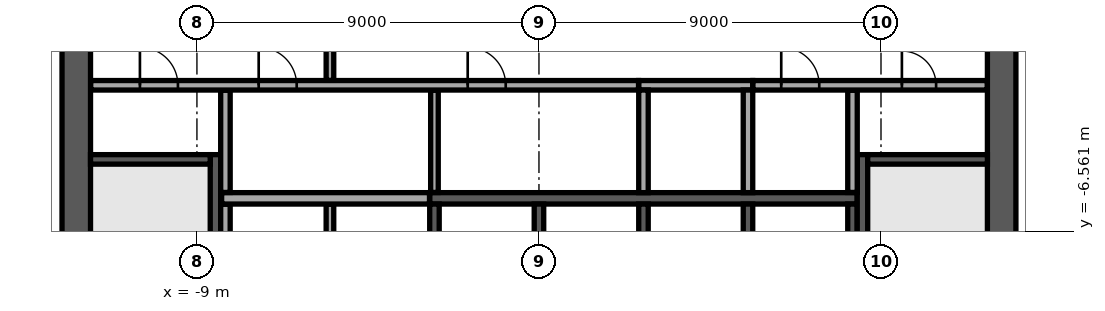
"""IFC4 building model, lengths in metres.
Left out: names, types, materials, properties, quantities, classifications, styles, units other than length and angle.
Written with IfcOpenShell. Run it as: python <this file> out.ifc"""

import sys

from ifc_helpers import new_model, si_unit, direction, frame, frame_2d, origin, place, context, subcontext, project, spatial, rectangle, extrude, element, fill, save


model = new_model("IFC4")
c1 = context("Model", 3, precision=1e-05, world=origin(), true_north=direction((0.0, 1.0)))
c2 = subcontext(c1, "Body", "Model", "MODEL_VIEW")
j1 = project(units=[si_unit("LENGTHUNIT", "METRE"), si_unit("PLANEANGLEUNIT", "RADIAN")], contexts=[c1])
p1 = place(None, origin())
s1 = spatial("IfcSite", under=j1, at=p1, CompositionType="ELEMENT")
p2 = place(p1, origin())
s2 = spatial("IfcBuilding", under=s1, at=p2, CompositionType="ELEMENT")
p3 = place(p2, frame((0.0, 0.0, 262.9)))
s3 = spatial("IfcBuildingStorey", under=s2, at=p3, CompositionType="ELEMENT", Elevation=262.9)
p4 = place(p3, frame((12.175, -11.8, 0.0), z_axis=(0.0, 0.0, 1.0), x_axis=(0.0, 1.0, 0.0)))
e1 = element("IfcWall", 1, at=p4, inside=s3, PredefinedType="SHEAR", context=c2, shape_type="SweptSolid", body=[
    extrude(rectangle(XDim=23.6, YDim=0.75, at=frame_2d((11.8, 0.0))), origin(), (0.0, 0.0, 1.0), 3.64),
])
p5 = place(p4, frame((10.6, 0.0, 0.0)))
e2 = element("IfcOpeningElement", 2, at=p5, cuts=e1, PredefinedType="OPENING", context=c2, shape_type="SweptSolid", body=[
    extrude(rectangle(XDim=2.4, YDim=2.4, at=frame_2d((1.2, 1.2))), frame((0.0, 0.385, 0.0), z_axis=(0.0, -1.0, 0.0), x_axis=(1.0, 0.0, 0.0)), (0.0, 0.0, 1.0), 0.77),
])
p6 = place(p3, frame((-12.175, -11.8, 0.0), z_axis=(0.0, 0.0, 1.0), x_axis=(0.0, 1.0, 0.0)))
e3 = element("IfcWall", 3, at=p6, inside=s3, PredefinedType="SHEAR", context=c2, shape_type="SweptSolid", body=[
    extrude(rectangle(XDim=23.6, YDim=0.75, at=frame_2d((11.8, 0.0))), origin(), (0.0, 0.0, 1.0), 3.64),
])
p7 = place(p6, frame((10.6, 0.0, 0.0)))
e4 = element("IfcOpeningElement", 4, at=p7, cuts=e3, PredefinedType="OPENING", context=c2, shape_type="SweptSolid", body=[
    extrude(rectangle(XDim=2.4, YDim=2.4, at=frame_2d((1.2, 1.2))), frame((0.0, 0.385, 0.0), z_axis=(0.0, -1.0, 0.0), x_axis=(1.0, 0.0, 0.0)), (0.0, 0.0, 1.0), 0.77),
])
p8 = place(p3, frame((-2.875, -5.7, 0.0), z_axis=(0.0, 0.0, 1.0), x_axis=(1.0, 0.0, 0.0)))
e5 = element("IfcWall", 5, at=p8, inside=s3, PredefinedType="SOLIDWALL", context=c2, shape_type="SweptSolid", body=[
    extrude(rectangle(XDim=11.25, YDim=0.3, at=frame_2d((5.625, 0.0))), origin(), (0.0, 0.0, 1.0), 3.64),
])
p9 = place(p3, frame((2.625, -2.725, 0.0), z_axis=(0.0, 0.0, 1.0), x_axis=(1.0, 0.0, 0.0)))
e6 = element("IfcWall", 6, at=p9, inside=s3, PredefinedType="SOLIDWALL", context=c2, shape_type="SweptSolid", body=[
    extrude(rectangle(XDim=3.0, YDim=0.25, at=frame_2d((1.5, 0.0))), origin(), (0.0, 0.0, 1.0), 3.64),
])
for number, where, z_axis, x_axis in (
    (7, (2.75, -5.55, 0.0), (0.0, 0.0, 1.0), (0.0, 1.0, 0.0)),
    (8, (5.5, -5.55, 0.0), (0.0, 0.0, 1.0), (0.0, 1.0, 0.0)),
    (9, (-2.75, -8.55, 0.0), (0.0, 0.0, 1.0), (0.0, 1.0, 0.0)),
    (10, (0.0, -8.55, 0.0), (0.0, 0.0, 1.0), (0.0, 1.0, 0.0)),
    (11, (2.75, -8.55, 0.0), (0.0, 0.0, 1.0), (0.0, 1.0, 0.0)),
    (12, (5.5, -8.55, 0.0), (0.0, 0.0, 1.0), (0.0, 1.0, 0.0)),
    (13, (8.25, -8.55, 0.0), (0.0, 0.0, 1.0), (0.0, 1.0, 0.0)),
):
    element("IfcWall", number, at=place(p3, frame(where, z_axis=z_axis, x_axis=x_axis)), inside=s3, PredefinedType="SOLIDWALL", context=c2, shape_type="SweptSolid", body=[
        extrude(rectangle(XDim=2.7, YDim=0.25, at=frame_2d((1.35, 0.0))), origin(), (0.0, 0.0, 1.0), 3.64),
    ])
p10 = place(p3, frame((-8.512, -4.55, 0.0), z_axis=(0.0, 0.0, 1.0), x_axis=(0.0, -1.0, 0.0)))
e14 = element("IfcWall", 14, at=p10, inside=s3, PredefinedType="SOLIDWALL", context=c2, shape_type="SweptSolid", body=[
    extrude(rectangle(XDim=7.25, YDim=0.275, at=frame_2d((3.625, 0.0))), origin(), (0.0, 0.0, 1.0), 3.64),
])
p11 = place(p10, frame((6.0, 0.0, 0.0)))
e15 = element("IfcOpeningElement", 15, at=p11, cuts=e14, PredefinedType="OPENING", context=c2, shape_type="SweptSolid", body=[
    extrude(rectangle(XDim=1.0, YDim=2.1, at=frame_2d((0.5, 1.05))), frame((0.0, 0.147, 0.0), z_axis=(0.0, -1.0, 0.0), x_axis=(1.0, 0.0, 0.0)), (0.0, 0.0, 1.0), 0.295),
])
p12 = place(p3, frame((-8.65, -4.675, 0.0), z_axis=(0.0, 0.0, 1.0), x_axis=(-1.0, 0.0, 0.0)))
e16 = element("IfcWall", 16, at=p12, inside=s3, PredefinedType="SOLIDWALL", context=c2, shape_type="SweptSolid", body=[
    extrude(rectangle(XDim=3.15, YDim=0.25, at=frame_2d((1.575, 0.0))), origin(), (0.0, 0.0, 1.0), 3.64),
])
p13 = place(p3, frame((8.512, -4.55, 0.0), z_axis=(0.0, 0.0, 1.0), x_axis=(0.0, -1.0, 0.0)))
e17 = element("IfcWall", 17, at=p13, inside=s3, PredefinedType="SOLIDWALL", context=c2, shape_type="SweptSolid", body=[
    extrude(rectangle(XDim=7.25, YDim=0.275, at=frame_2d((3.625, 0.0))), origin(), (0.0, 0.0, 1.0), 3.64),
])
p14 = place(p13, frame((6.0, 0.0, 0.0)))
e18 = element("IfcOpeningElement", 18, at=p14, cuts=e17, PredefinedType="OPENING", context=c2, shape_type="SweptSolid", body=[
    extrude(rectangle(XDim=1.0, YDim=2.1, at=frame_2d((0.5, 1.05))), frame((0.0, 0.147, 0.0), z_axis=(0.0, -1.0, 0.0), x_axis=(1.0, 0.0, 0.0)), (0.0, 0.0, 1.0), 0.295),
])
p15 = place(p3, frame((8.65, -4.675, 0.0), z_axis=(0.0, 0.0, 1.0), x_axis=(1.0, 0.0, 0.0)))
e19 = element("IfcWall", 19, at=p15, inside=s3, PredefinedType="SOLIDWALL", context=c2, shape_type="SweptSolid", body=[
    extrude(rectangle(XDim=3.15, YDim=0.25, at=frame_2d((1.575, 0.0))), origin(), (0.0, 0.0, 1.0), 3.64),
])
p16 = place(p3, frame((-8.25, -8.545, 0.0), z_axis=(0.0, 0.0, 1.0), x_axis=(0.0, 1.0, 0.0)))
e20 = element("IfcWall", 20, at=p16, inside=s3, PredefinedType="PARTITIONING", context=c2, shape_type="SweptSolid", body=[
    extrude(rectangle(XDim=2.69, YDim=0.25, at=frame_2d((1.345, 0.0))), origin(), (0.0, 0.0, 1.0), 3.64),
])
p17 = place(p3, frame((-5.5, -8.545, 0.0), z_axis=(0.0, 0.0, 1.0), x_axis=(0.0, 1.0, 0.0)))
e21 = element("IfcWall", 21, at=p17, inside=s3, PredefinedType="PARTITIONING", context=c2, shape_type="SweptSolid", body=[
    extrude(rectangle(XDim=2.69, YDim=0.2, at=frame_2d((1.345, 0.0))), origin(), (0.0, 0.0, 1.0), 3.64),
])
p18 = place(p3, frame((-8.35, -5.7, 0.0), z_axis=(0.0, 0.0, 1.0), x_axis=(1.0, 0.0, 0.0)))
e22 = element("IfcWall", 22, at=p18, inside=s3, PredefinedType="PARTITIONING", context=c2, shape_type="SweptSolid", body=[
    extrude(rectangle(XDim=5.47, YDim=0.3, at=frame_2d((2.735, 0.0))), origin(), (0.0, 0.0, 1.0), 3.64),
])
p19 = place(p3, frame((-8.25, -5.545, 0.0), z_axis=(0.0, 0.0, 1.0), x_axis=(0.0, 1.0, 0.0)))
e23 = element("IfcWall", 23, at=p19, inside=s3, PredefinedType="PARTITIONING", context=c2, shape_type="SweptSolid", body=[
    extrude(rectangle(XDim=2.69, YDim=0.25, at=frame_2d((1.345, 0.0))), origin(), (0.0, 0.0, 1.0), 3.64),
])
p20 = place(p3, frame((-2.75, -5.545, 0.0), z_axis=(0.0, 0.0, 1.0), x_axis=(0.0, 1.0, 0.0)))
e24 = element("IfcWall", 24, at=p20, inside=s3, PredefinedType="PARTITIONING", context=c2, shape_type="SweptSolid", body=[
    extrude(rectangle(XDim=2.69, YDim=0.2, at=frame_2d((1.345, 0.0))), origin(), (0.0, 0.0, 1.0), 3.64),
])
p21 = place(p3, frame((8.25, -5.545, 0.0), z_axis=(0.0, 0.0, 1.0), x_axis=(0.0, 1.0, 0.0)))
e25 = element("IfcWall", 25, at=p21, inside=s3, PredefinedType="PARTITIONING", context=c2, shape_type="SweptSolid", body=[
    extrude(rectangle(XDim=2.69, YDim=0.25, at=frame_2d((1.345, 0.0))), origin(), (0.0, 0.0, 1.0), 3.64),
])
p22 = place(p3, frame((-11.795, -2.725, 0.0), z_axis=(0.0, 0.0, 1.0), x_axis=(1.0, 0.0, 0.0)))
e26 = element("IfcWall", 26, at=p22, inside=s3, PredefinedType="PARTITIONING", context=c2, shape_type="SweptSolid", body=[
    extrude(rectangle(XDim=14.415, YDim=0.25, at=frame_2d((7.208, 0.0))), origin(), (0.0, 0.0, 1.0), 3.64),
])
p23 = place(p22, frame((1.295, 0.0, 0.0)))
e27 = element("IfcOpeningElement", 27, at=p23, cuts=e26, PredefinedType="OPENING", context=c2, shape_type="SweptSolid", body=[
    extrude(rectangle(XDim=1.0, YDim=2.1, at=frame_2d((0.5, 1.05))), frame((0.0, 0.135, 0.0), z_axis=(0.0, -1.0, 0.0), x_axis=(1.0, 0.0, 0.0)), (0.0, 0.0, 1.0), 0.27),
])
p24 = place(p22, frame((4.42, 0.0, 0.0)))
e28 = element("IfcOpeningElement", 28, at=p24, cuts=e26, PredefinedType="OPENING", context=c2, shape_type="SweptSolid", body=[
    extrude(rectangle(XDim=1.0, YDim=2.1, at=frame_2d((0.5, 1.05))), frame((0.0, 0.135, 0.0), z_axis=(0.0, -1.0, 0.0), x_axis=(1.0, 0.0, 0.0)), (0.0, 0.0, 1.0), 0.27),
])
p25 = place(p22, frame((9.92, 0.0, 0.0)))
e29 = element("IfcOpeningElement", 29, at=p25, cuts=e26, PredefinedType="OPENING", context=c2, shape_type="SweptSolid", body=[
    extrude(rectangle(XDim=1.0, YDim=2.1, at=frame_2d((0.5, 1.05))), frame((0.0, 0.135, 0.0), z_axis=(0.0, -1.0, 0.0), x_axis=(1.0, 0.0, 0.0)), (0.0, 0.0, 1.0), 0.27),
])
p26 = place(p3, frame((5.63, -2.725, 0.0), z_axis=(0.0, 0.0, 1.0), x_axis=(1.0, 0.0, 0.0)))
e30 = element("IfcWall", 30, at=p26, inside=s3, PredefinedType="PARTITIONING", context=c2, shape_type="SweptSolid", body=[
    extrude(rectangle(XDim=6.165, YDim=0.25, at=frame_2d((3.083, 0.0))), origin(), (0.0, 0.0, 1.0), 3.64),
])
p27 = place(p26, frame((0.745, 0.0, 0.0)))
e31 = element("IfcOpeningElement", 31, at=p27, cuts=e30, PredefinedType="OPENING", context=c2, shape_type="SweptSolid", body=[
    extrude(rectangle(XDim=1.0, YDim=2.1, at=frame_2d((0.5, 1.05))), frame((0.0, 0.135, 0.0), z_axis=(0.0, -1.0, 0.0), x_axis=(1.0, 0.0, 0.0)), (0.0, 0.0, 1.0), 0.27),
])
p28 = place(p26, frame((3.92, 0.0, 0.0)))
e32 = element("IfcOpeningElement", 32, at=p28, cuts=e30, PredefinedType="OPENING", context=c2, shape_type="SweptSolid", body=[
    extrude(rectangle(XDim=0.9, YDim=2.1, at=frame_2d((0.45, 1.05))), frame((0.0, 0.135, 0.0), z_axis=(0.0, -1.0, 0.0), x_axis=(1.0, 0.0, 0.0)), (0.0, 0.0, 1.0), 0.27),
])
p29 = place(p3, frame((-5.5, -2.595, 0.0), z_axis=(0.0, 0.0, 1.0), x_axis=(0.0, 1.0, 0.0)))
e33 = element("IfcWall", 33, at=p29, inside=s3, PredefinedType="PARTITIONING", context=c2, shape_type="SweptSolid", body=[
    extrude(rectangle(XDim=5.19, YDim=0.2, at=frame_2d((2.595, 0.0))), origin(), (0.0, 0.0, 1.0), 3.64),
])
p30 = place(p29, frame((1.395, 0.0, 0.0)))
e34 = element("IfcOpeningElement", 34, at=p30, cuts=e33, PredefinedType="OPENING", context=c2, shape_type="SweptSolid", body=[
    extrude(rectangle(XDim=2.4, YDim=2.4, at=frame_2d((1.2, 1.2))), frame((0.0, 0.11, 0.0), z_axis=(0.0, -1.0, 0.0), x_axis=(1.0, 0.0, 0.0)), (0.0, 0.0, 1.0), 0.22),
])
p31 = place(p3, frame((-8.015, 32.917, 0.0), z_axis=(0.0, 0.0, 1.0), x_axis=(-0.500001675963, -0.866024436165, 0.0)))
e35 = element("IfcWall", 35, at=p31, inside=s3, PredefinedType="STANDARD", context=c2, shape_type="SweptSolid", body=[
    extrude(rectangle(XDim=48.843, YDim=0.6, at=frame_2d((24.421, 0.0))), origin(), (0.0, 0.0, 1.0), 3.64),
])
p32 = place(p31, frame((1.22, 0.0, 0.9)))
e36 = element("IfcOpeningElement", 36, at=p32, cuts=e35, PredefinedType="OPENING", context=c2, shape_type="SweptSolid", body=[
    extrude(rectangle(XDim=2.0, YDim=2.1, at=frame_2d((1.0, 1.05))), frame((0.0, 0.31, 0.0), z_axis=(0.0, -1.0, 0.0), x_axis=(1.0, 0.0, 0.0)), (0.0, 0.0, 1.0), 0.62),
])
p33 = place(p31, frame((5.66, 0.0, 0.9)))
e37 = element("IfcOpeningElement", 37, at=p33, cuts=e35, PredefinedType="OPENING", context=c2, shape_type="SweptSolid", body=[
    extrude(rectangle(XDim=2.0, YDim=2.1, at=frame_2d((1.0, 1.05))), frame((0.0, 0.31, 0.0), z_axis=(0.0, -1.0, 0.0), x_axis=(1.0, 0.0, 0.0)), (0.0, 0.0, 1.0), 0.62),
])
p34 = place(p31, frame((10.101, 0.0, 0.9)))
e38 = element("IfcOpeningElement", 38, at=p34, cuts=e35, PredefinedType="OPENING", context=c2, shape_type="SweptSolid", body=[
    extrude(rectangle(XDim=2.0, YDim=2.1, at=frame_2d((1.0, 1.05))), frame((0.0, 0.31, 0.0), z_axis=(0.0, -1.0, 0.0), x_axis=(1.0, 0.0, 0.0)), (0.0, 0.0, 1.0), 0.62),
])
p35 = place(p31, frame((14.541, 0.0, 0.9)))
e39 = element("IfcOpeningElement", 39, at=p35, cuts=e35, PredefinedType="OPENING", context=c2, shape_type="SweptSolid", body=[
    extrude(rectangle(XDim=2.0, YDim=2.1, at=frame_2d((1.0, 1.05))), frame((0.0, 0.31, 0.0), z_axis=(0.0, -1.0, 0.0), x_axis=(1.0, 0.0, 0.0)), (0.0, 0.0, 1.0), 0.62),
])
p36 = place(p31, frame((18.981, 0.0, 0.9)))
e40 = element("IfcOpeningElement", 40, at=p36, cuts=e35, PredefinedType="OPENING", context=c2, shape_type="SweptSolid", body=[
    extrude(rectangle(XDim=2.0, YDim=2.1, at=frame_2d((1.0, 1.05))), frame((0.0, 0.31, 0.0), z_axis=(0.0, -1.0, 0.0), x_axis=(1.0, 0.0, 0.0)), (0.0, 0.0, 1.0), 0.62),
])
p37 = place(p31, frame((23.422, 0.0, 0.9)))
e41 = element("IfcOpeningElement", 41, at=p37, cuts=e35, PredefinedType="OPENING", context=c2, shape_type="SweptSolid", body=[
    extrude(rectangle(XDim=2.0, YDim=2.1, at=frame_2d((1.0, 1.05))), frame((0.0, 0.31, 0.0), z_axis=(0.0, -1.0, 0.0), x_axis=(1.0, 0.0, 0.0)), (0.0, 0.0, 1.0), 0.62),
])
p38 = place(p31, frame((27.862, 0.0, 0.9)))
e42 = element("IfcOpeningElement", 42, at=p38, cuts=e35, PredefinedType="OPENING", context=c2, shape_type="SweptSolid", body=[
    extrude(rectangle(XDim=2.0, YDim=2.1, at=frame_2d((1.0, 1.05))), frame((0.0, 0.31, 0.0), z_axis=(0.0, -1.0, 0.0), x_axis=(1.0, 0.0, 0.0)), (0.0, 0.0, 1.0), 0.62),
])
p39 = place(p31, frame((32.302, 0.0, 0.9)))
e43 = element("IfcOpeningElement", 43, at=p39, cuts=e35, PredefinedType="OPENING", context=c2, shape_type="SweptSolid", body=[
    extrude(rectangle(XDim=2.0, YDim=2.1, at=frame_2d((1.0, 1.05))), frame((0.0, 0.31, 0.0), z_axis=(0.0, -1.0, 0.0), x_axis=(1.0, 0.0, 0.0)), (0.0, 0.0, 1.0), 0.62),
])
p40 = place(p31, frame((36.742, 0.0, 0.9)))
e44 = element("IfcOpeningElement", 44, at=p40, cuts=e35, PredefinedType="OPENING", context=c2, shape_type="SweptSolid", body=[
    extrude(rectangle(XDim=2.0, YDim=2.1, at=frame_2d((1.0, 1.05))), frame((0.0, 0.31, 0.0), z_axis=(0.0, -1.0, 0.0), x_axis=(1.0, 0.0, 0.0)), (0.0, 0.0, 1.0), 0.62),
])
p41 = place(p31, frame((41.183, 0.0, 0.9)))
e45 = element("IfcOpeningElement", 45, at=p41, cuts=e35, PredefinedType="OPENING", context=c2, shape_type="SweptSolid", body=[
    extrude(rectangle(XDim=2.0, YDim=2.1, at=frame_2d((1.0, 1.05))), frame((0.0, 0.31, 0.0), z_axis=(0.0, -1.0, 0.0), x_axis=(1.0, 0.0, 0.0)), (0.0, 0.0, 1.0), 0.62),
])
p42 = place(p31, frame((45.623, 0.0, 0.9)))
e46 = element("IfcOpeningElement", 46, at=p42, cuts=e35, PredefinedType="OPENING", context=c2, shape_type="SweptSolid", body=[
    extrude(rectangle(XDim=2.0, YDim=2.1, at=frame_2d((1.0, 1.05))), frame((0.0, 0.31, 0.0), z_axis=(0.0, -1.0, 0.0), x_axis=(1.0, 0.0, 0.0)), (0.0, 0.0, 1.0), 0.62),
])
p43 = place(p3, frame((8.094, -32.782, 0.0), z_axis=(0.0, 0.0, 1.0), x_axis=(0.499997945818, 0.866026589763, 0.0)))
e47 = element("IfcWall", 47, at=p43, inside=s3, PredefinedType="STANDARD", context=c2, shape_type="SweptSolid", body=[
    extrude(rectangle(XDim=48.686, YDim=0.6, at=frame_2d((24.343, 0.0))), origin(), (0.0, 0.0, 1.0), 3.64),
])
p44 = place(p43, frame((1.213, 0.0, 0.9)))
e48 = element("IfcOpeningElement", 48, at=p44, cuts=e47, PredefinedType="OPENING", context=c2, shape_type="SweptSolid", body=[
    extrude(rectangle(XDim=2.0, YDim=2.1, at=frame_2d((1.0, 1.05))), frame((0.0, 0.31, 0.0), z_axis=(0.0, -1.0, 0.0), x_axis=(1.0, 0.0, 0.0)), (0.0, 0.0, 1.0), 0.62),
])
p45 = place(p43, frame((5.639, 0.0, 0.9)))
e49 = element("IfcOpeningElement", 49, at=p45, cuts=e47, PredefinedType="OPENING", context=c2, shape_type="SweptSolid", body=[
    extrude(rectangle(XDim=2.0, YDim=2.1, at=frame_2d((1.0, 1.05))), frame((0.0, 0.31, 0.0), z_axis=(0.0, -1.0, 0.0), x_axis=(1.0, 0.0, 0.0)), (0.0, 0.0, 1.0), 0.62),
])
p46 = place(p43, frame((10.065, 0.0, 0.9)))
e50 = element("IfcOpeningElement", 50, at=p46, cuts=e47, PredefinedType="OPENING", context=c2, shape_type="SweptSolid", body=[
    extrude(rectangle(XDim=2.0, YDim=2.1, at=frame_2d((1.0, 1.05))), frame((0.0, 0.31, 0.0), z_axis=(0.0, -1.0, 0.0), x_axis=(1.0, 0.0, 0.0)), (0.0, 0.0, 1.0), 0.62),
])
p47 = place(p43, frame((14.491, 0.0, 0.9)))
e51 = element("IfcOpeningElement", 51, at=p47, cuts=e47, PredefinedType="OPENING", context=c2, shape_type="SweptSolid", body=[
    extrude(rectangle(XDim=2.0, YDim=2.1, at=frame_2d((1.0, 1.05))), frame((0.0, 0.31, 0.0), z_axis=(0.0, -1.0, 0.0), x_axis=(1.0, 0.0, 0.0)), (0.0, 0.0, 1.0), 0.62),
])
p48 = place(p43, frame((18.917, 0.0, 0.9)))
e52 = element("IfcOpeningElement", 52, at=p48, cuts=e47, PredefinedType="OPENING", context=c2, shape_type="SweptSolid", body=[
    extrude(rectangle(XDim=2.0, YDim=2.1, at=frame_2d((1.0, 1.05))), frame((0.0, 0.31, 0.0), z_axis=(0.0, -1.0, 0.0), x_axis=(1.0, 0.0, 0.0)), (0.0, 0.0, 1.0), 0.62),
])
p49 = place(p43, frame((23.343, 0.0, 0.9)))
e53 = element("IfcOpeningElement", 53, at=p49, cuts=e47, PredefinedType="OPENING", context=c2, shape_type="SweptSolid", body=[
    extrude(rectangle(XDim=2.0, YDim=2.1, at=frame_2d((1.0, 1.05))), frame((0.0, 0.31, 0.0), z_axis=(0.0, -1.0, 0.0), x_axis=(1.0, 0.0, 0.0)), (0.0, 0.0, 1.0), 0.62),
])
p50 = place(p43, frame((27.769, 0.0, 0.9)))
e54 = element("IfcOpeningElement", 54, at=p50, cuts=e47, PredefinedType="OPENING", context=c2, shape_type="SweptSolid", body=[
    extrude(rectangle(XDim=2.0, YDim=2.1, at=frame_2d((1.0, 1.05))), frame((0.0, 0.31, 0.0), z_axis=(0.0, -1.0, 0.0), x_axis=(1.0, 0.0, 0.0)), (0.0, 0.0, 1.0), 0.62),
])
p51 = place(p43, frame((32.195, 0.0, 0.9)))
e55 = element("IfcOpeningElement", 55, at=p51, cuts=e47, PredefinedType="OPENING", context=c2, shape_type="SweptSolid", body=[
    extrude(rectangle(XDim=2.0, YDim=2.1, at=frame_2d((1.0, 1.05))), frame((0.0, 0.31, 0.0), z_axis=(0.0, -1.0, 0.0), x_axis=(1.0, 0.0, 0.0)), (0.0, 0.0, 1.0), 0.62),
])
p52 = place(p43, frame((36.621, 0.0, 0.9)))
e56 = element("IfcOpeningElement", 56, at=p52, cuts=e47, PredefinedType="OPENING", context=c2, shape_type="SweptSolid", body=[
    extrude(rectangle(XDim=2.0, YDim=2.1, at=frame_2d((1.0, 1.05))), frame((0.0, 0.31, 0.0), z_axis=(0.0, -1.0, 0.0), x_axis=(1.0, 0.0, 0.0)), (0.0, 0.0, 1.0), 0.62),
])
p53 = place(p43, frame((41.047, 0.0, 0.9)))
e57 = element("IfcOpeningElement", 57, at=p53, cuts=e47, PredefinedType="OPENING", context=c2, shape_type="SweptSolid", body=[
    extrude(rectangle(XDim=2.0, YDim=2.1, at=frame_2d((1.0, 1.05))), frame((0.0, 0.31, 0.0), z_axis=(0.0, -1.0, 0.0), x_axis=(1.0, 0.0, 0.0)), (0.0, 0.0, 1.0), 0.62),
])
p54 = place(p43, frame((45.473, 0.0, 0.9)))
e58 = element("IfcOpeningElement", 58, at=p54, cuts=e47, PredefinedType="OPENING", context=c2, shape_type="SweptSolid", body=[
    extrude(rectangle(XDim=2.0, YDim=2.1, at=frame_2d((1.0, 1.05))), frame((0.0, 0.31, 0.0), z_axis=(0.0, -1.0, 0.0), x_axis=(1.0, 0.0, 0.0)), (0.0, 0.0, 1.0), 0.62),
])
p55 = place(p23, origin())
e59 = element("IfcDoor", 59, at=p55, inside=s3, OperationType="SINGLE_SWING_LEFT", PredefinedType="DOOR", context=c2, shape_type="SweptSolid", body=[
    extrude(rectangle(XDim=1.0, YDim=2.1, at=frame_2d((0.5, 1.05))), frame((0.0, 0.025, 0.0), z_axis=(0.0, -1.0, 0.0), x_axis=(1.0, 0.0, 0.0)), (0.0, 0.0, 1.0), 0.05),
])
fill(e27, e59)
p56 = place(p27, origin())
e60 = element("IfcDoor", 60, at=p56, inside=s3, OperationType="SINGLE_SWING_LEFT", PredefinedType="DOOR", context=c2, shape_type="SweptSolid", body=[
    extrude(rectangle(XDim=1.0, YDim=2.1, at=frame_2d((0.5, 1.05))), frame((0.0, 0.025, 0.0), z_axis=(0.0, -1.0, 0.0), x_axis=(1.0, 0.0, 0.0)), (0.0, 0.0, 1.0), 0.05),
])
fill(e31, e60)
p57 = place(p28, origin())
e61 = element("IfcDoor", 61, at=p57, inside=s3, OperationType="SINGLE_SWING_LEFT", PredefinedType="DOOR", context=c2, shape_type="SweptSolid", body=[
    extrude(rectangle(XDim=0.9, YDim=2.1, at=frame_2d((0.45, 1.05))), frame((0.0, 0.025, 0.0), z_axis=(0.0, -1.0, 0.0), x_axis=(1.0, 0.0, 0.0)), (0.0, 0.0, 1.0), 0.05),
])
fill(e32, e61)
p58 = place(p24, origin())
e62 = element("IfcDoor", 62, at=p58, inside=s3, OperationType="SINGLE_SWING_LEFT", PredefinedType="DOOR", context=c2, shape_type="SweptSolid", body=[
    extrude(rectangle(XDim=1.0, YDim=2.1, at=frame_2d((0.5, 1.05))), frame((0.0, 0.025, 0.0), z_axis=(0.0, -1.0, 0.0), x_axis=(1.0, 0.0, 0.0)), (0.0, 0.0, 1.0), 0.05),
])
fill(e28, e62)
p59 = place(p25, origin())
e63 = element("IfcDoor", 63, at=p59, inside=s3, OperationType="SINGLE_SWING_LEFT", PredefinedType="DOOR", context=c2, shape_type="SweptSolid", body=[
    extrude(rectangle(XDim=1.0, YDim=2.1, at=frame_2d((0.5, 1.05))), frame((0.0, 0.025, 0.0), z_axis=(0.0, -1.0, 0.0), x_axis=(1.0, 0.0, 0.0)), (0.0, 0.0, 1.0), 0.05),
])
fill(e29, e63)
save(model, sys.argv[1])
